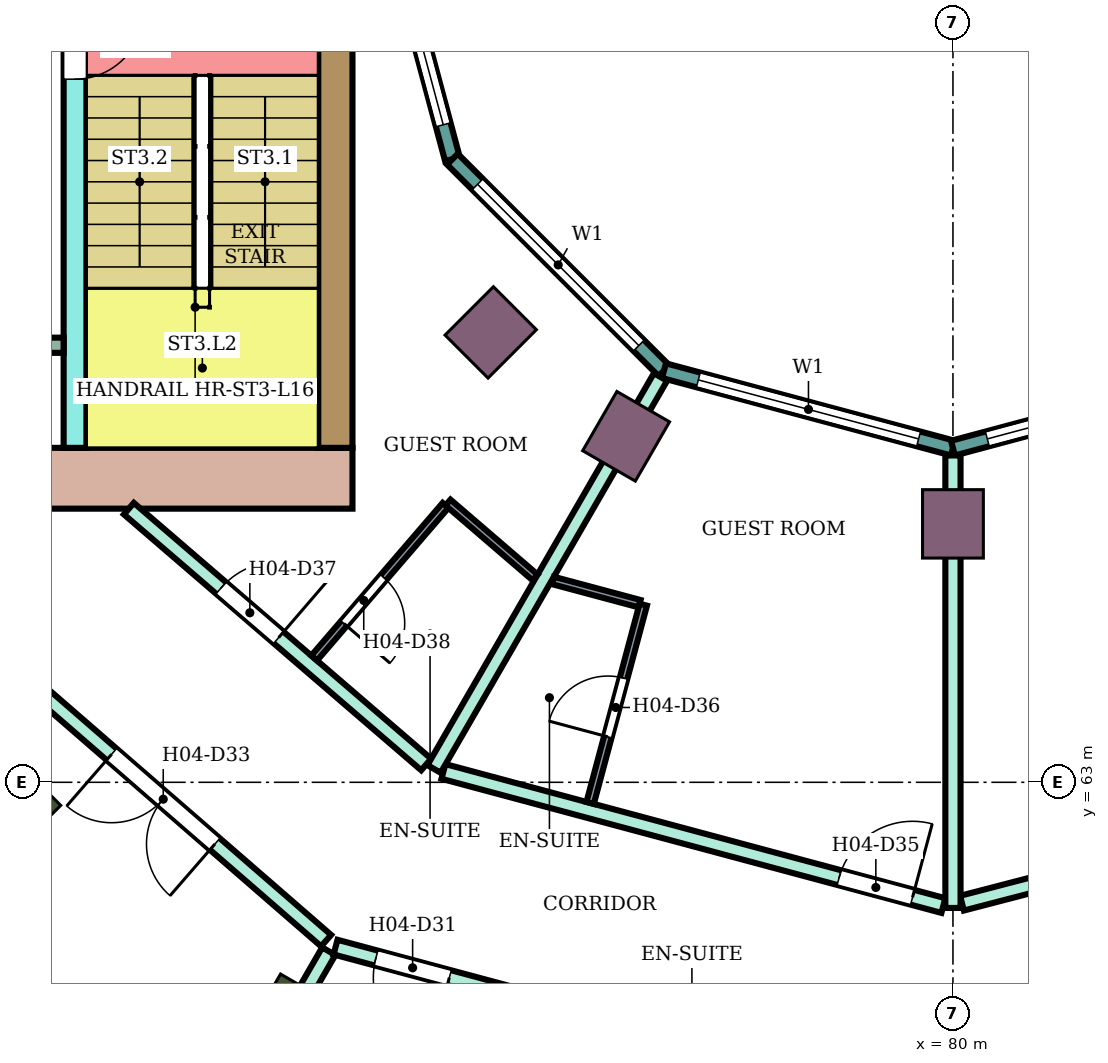
"""IFC4 building model, lengths in metres.
Left out: names, types, materials, properties, quantities, classifications, styles, units other than length and angle.
Written with IfcOpenShell. Run it as: python <this file> out.ifc"""

import sys

from ifc_helpers import new_model, si_unit, direction, frame, frame_2d, origin, origin_2d, place, context, subcontext, project, spatial, rectangle, extrude, element, fill, save


model = new_model("IFC4")
c1 = context("Model", 3, precision=1e-05, world=origin(), true_north=direction((0.0, 1.0)))
c2 = subcontext(c1, "Body", "Model", "MODEL_VIEW")
j1 = project(units=[si_unit("LENGTHUNIT", "METRE"), si_unit("PLANEANGLEUNIT", "RADIAN")], contexts=[c1])
p1 = place(None, origin())
s1 = spatial("IfcSite", under=j1, at=p1, CompositionType="ELEMENT")
p2 = place(p1, origin())
s2 = spatial("IfcBuilding", under=s1, at=p2, CompositionType="ELEMENT")
p3 = place(p2, frame((0.0, 0.0, 70.6)))
s3 = spatial("IfcBuildingStorey", under=s2, at=p3, CompositionType="ELEMENT", Elevation=70.6)
for number, where, z_axis, x_axis in (
    (1, (67.555, 62.555, 0.0), (0.0, 0.0, 1.0), (-0.707, -0.707, 0.0)),
    (2, (71.2, 59.758, 0.0), (0.0, 0.0, 1.0), (-0.5, -0.866, 0.0)),
):
    element("IfcColumn", number, at=place(p3, frame(where, z_axis=z_axis, x_axis=x_axis)), inside=s3, PredefinedType="COLUMN", context=c2, shape_type="SweptSolid", body=[
        extrude(rectangle(XDim=1.2, YDim=0.8, at=origin_2d()), origin(), (0.0, 0.0, 1.0), 3.8),
    ])
for number, where, z_axis, x_axis in (
    (3, (73.919, 68.919, 0.0), (0.0, 0.0, 1.0), (-0.707, -0.707, 0.0)),
    (4, (75.7, 67.552, 0.0), (0.0, 0.0, 1.0), (-0.5, -0.866, 0.0)),
    (5, (80.0, 66.4, 0.0), (0.0, 0.0, 1.0), (0.0, -1.0, 0.0)),
):
    element("IfcColumn", number, at=place(p3, frame(where, z_axis=z_axis, x_axis=x_axis)), inside=s3, PredefinedType="COLUMN", context=c2, shape_type="SweptSolid", body=[
        extrude(rectangle(XDim=0.9, YDim=0.8, at=origin_2d()), origin(), (0.0, 0.0, 1.0), 3.8),
    ])
p4 = place(p3, frame((72.1, 67.0, 0.0), z_axis=(0.0, 0.0, 1.0), x_axis=(-1.0, 0.0, 0.0)))
e6 = element("IfcWall", 6, at=p4, inside=s3, PredefinedType="SHEAR", context=c2, shape_type="SweptSolid", body=[
    extrude(rectangle(XDim=14.7, YDim=0.8, at=frame_2d((7.35, 0.0))), origin(), (0.0, 0.0, 1.0), 3.4),
])
p5 = place(p4, frame((4.2, 0.0, 0.0)))
e7 = element("IfcOpeningElement", 7, at=p5, cuts=e6, PredefinedType="OPENING", context=c2, shape_type="SweptSolid", body=[
    extrude(rectangle(XDim=2.4, YDim=2.4, at=frame_2d((1.2, 1.2))), frame((0.0, 0.41, 0.0), z_axis=(0.0, -1.0, 0.0), x_axis=(1.0, 0.0, 0.0)), (0.0, 0.0, 1.0), 0.82),
])
p6 = place(p3, frame((71.875, 75.0, 0.0), z_axis=(0.0, 0.0, 1.0), x_axis=(0.0, -1.0, 0.0)))
e8 = element("IfcWall", 8, at=p6, inside=s3, PredefinedType="SHEAR", context=c2, shape_type="SweptSolid", body=[
    extrude(rectangle(XDim=7.6, YDim=0.45, at=frame_2d((3.8, 0.0))), origin(), (0.0, 0.0, 1.0), 3.4),
])
p7 = place(p3, frame((68.45, 75.0, 0.0), z_axis=(0.0, 0.0, 1.0), x_axis=(0.0, -1.0, 0.0)))
e9 = element("IfcWall", 9, at=p7, inside=s3, PredefinedType="SHEAR", context=c2, shape_type="SweptSolid", body=[
    extrude(rectangle(XDim=7.6, YDim=0.3, at=frame_2d((3.8, 0.0))), origin(), (0.0, 0.0, 1.0), 3.4),
])
p8 = place(p7, frame((1.85, 0.0, 0.0)))
e10 = element("IfcOpeningElement", 10, at=p8, cuts=e9, PredefinedType="OPENING", context=c2, shape_type="SweptSolid", body=[
    extrude(rectangle(XDim=0.9, YDim=2.1, at=frame_2d((0.45, 1.05))), frame((0.0, 0.16, 0.0), z_axis=(0.0, -1.0, 0.0), x_axis=(1.0, 0.0, 0.0)), (0.0, 0.0, 1.0), 0.32),
])
p9 = place(p3, frame((68.3, 68.75, 0.0), z_axis=(0.0, 0.0, 1.0), x_axis=(-1.0, 0.0, 0.0)))
e11 = element("IfcWall", 11, at=p9, inside=s3, PredefinedType="SHEAR", context=c2, shape_type="SweptSolid", body=[
    extrude(rectangle(XDim=4.65, YDim=0.2, at=frame_2d((2.325, 0.0))), origin(), (0.0, 0.0, 1.0), 3.4),
])
p10 = place(p3, frame((72.396, 75.0, 0.0), z_axis=(0.0, 0.0, 1.0), x_axis=(0.258789828301, -0.965933654434, 0.0)))
e12 = element("IfcWall", 12, at=p10, inside=s3, PredefinedType="NOTDEFINED", context=c2, shape_type="SweptSolid", body=[
    extrude(rectangle(XDim=3.936, YDim=0.2, at=frame_2d((1.968, 0.0))), origin(), (0.0, 0.0, 1.0), 3.8),
])
p11 = place(p10, frame((0.468, 0.0, 0.9)))
e13 = element("IfcOpeningElement", 13, at=p11, cuts=e12, PredefinedType="OPENING", context=c2, shape_type="SweptSolid", body=[
    extrude(rectangle(XDim=3.0, YDim=2.3, at=frame_2d((1.5, 1.15))), frame((0.0, 0.11, 0.0), z_axis=(0.0, -1.0, 0.0), x_axis=(1.0, 0.0, 0.0)), (0.0, 0.0, 1.0), 0.22),
])
p12 = place(p3, frame((73.415, 71.198, 0.0), z_axis=(0.0, 0.0, 1.0), x_axis=(0.707106781187, -0.707106781187, 0.0)))
e14 = element("IfcWall", 14, at=p12, inside=s3, PredefinedType="NOTDEFINED", context=c2, shape_type="SweptSolid", body=[
    extrude(rectangle(XDim=3.936, YDim=0.2, at=frame_2d((1.968, 0.0))), origin(), (0.0, 0.0, 1.0), 3.8),
])
p13 = place(p12, frame((0.468, 0.0, 0.9)))
e15 = element("IfcOpeningElement", 15, at=p13, cuts=e14, PredefinedType="OPENING", context=c2, shape_type="SweptSolid", body=[
    extrude(rectangle(XDim=3.0, YDim=2.3, at=frame_2d((1.5, 1.15))), frame((0.0, 0.11, 0.0), z_axis=(0.0, -1.0, 0.0), x_axis=(1.0, 0.0, 0.0)), (0.0, 0.0, 1.0), 0.22),
])
p14 = place(p3, frame((76.198, 68.415, 0.0), z_axis=(0.0, 0.0, 1.0), x_axis=(0.965933654434, -0.258789828301, 0.0)))
e16 = element("IfcWall", 16, at=p14, inside=s3, PredefinedType="NOTDEFINED", context=c2, shape_type="SweptSolid", body=[
    extrude(rectangle(XDim=3.936, YDim=0.2, at=frame_2d((1.968, 0.0))), origin(), (0.0, 0.0, 1.0), 3.8),
])
p15 = place(p14, frame((0.468, 0.0, 0.9)))
e17 = element("IfcOpeningElement", 17, at=p15, cuts=e16, PredefinedType="OPENING", context=c2, shape_type="SweptSolid", body=[
    extrude(rectangle(XDim=3.0, YDim=2.3, at=frame_2d((1.5, 1.15))), frame((0.0, 0.11, 0.0), z_axis=(0.0, -1.0, 0.0), x_axis=(1.0, 0.0, 0.0)), (0.0, 0.0, 1.0), 0.22),
])
p16 = place(p3, frame((80.0, 67.396, 0.0), z_axis=(0.0, 0.0, 1.0), x_axis=(0.965933654434, 0.258789828301, 0.0)))
e18 = element("IfcWall", 18, at=p16, inside=s3, PredefinedType="NOTDEFINED", context=c2, shape_type="SweptSolid", body=[
    extrude(rectangle(XDim=3.936, YDim=0.2, at=frame_2d((1.968, 0.0))), origin(), (0.0, 0.0, 1.0), 3.8),
])
p17 = place(p16, frame((0.468, 0.0, 0.9)))
e19 = element("IfcOpeningElement", 19, at=p17, cuts=e18, PredefinedType="OPENING", context=c2, shape_type="SweptSolid", body=[
    extrude(rectangle(XDim=3.0, YDim=2.3, at=frame_2d((1.5, 1.15))), frame((0.0, 0.11, 0.0), z_axis=(0.0, -1.0, 0.0), x_axis=(1.0, 0.0, 0.0)), (0.0, 0.0, 1.0), 0.22),
])
p18 = place(p3, frame((66.924, 65.111, 0.0), z_axis=(0.0, 0.0, 1.0), x_axis=(0.755023669255, -0.655697536113, 0.0)))
e20 = element("IfcWall", 20, at=p18, inside=s3, PredefinedType="PARTITIONING", context=c2, shape_type="SweptSolid", body=[
    extrude(rectangle(XDim=6.396, YDim=0.2, at=frame_2d((3.198, 0.0))), origin(), (0.0, 0.0, 1.0), 3.35),
])
p19 = place(p18, frame((2.658, 0.0, 0.0)))
e21 = element("IfcOpeningElement", 21, at=p19, cuts=e20, PredefinedType="OPENING", context=c2, shape_type="SweptSolid", body=[
    extrude(rectangle(XDim=1.8, YDim=2.1, at=frame_2d((0.9, 1.05))), frame((0.0, 0.11, 0.0), z_axis=(0.0, -1.0, 0.0), x_axis=(1.0, 0.0, 0.0)), (0.0, 0.0, 1.0), 0.22),
])
p20 = place(p3, frame((67.099, 52.661, 0.0), z_axis=(0.0, 0.0, 1.0), x_axis=(0.500234203776, 0.86589014394, 0.0)))
e22 = element("IfcWall", 22, at=p20, inside=s3, PredefinedType="PARTITIONING", context=c2, shape_type="SweptSolid", body=[
    extrude(rectangle(XDim=9.374, YDim=0.2, at=frame_2d((4.687, 0.0))), origin(), (0.0, 0.0, 1.0), 3.35),
])
p21 = place(p3, frame((69.158, 66.6, 0.0), z_axis=(0.0, 0.0, 1.0), x_axis=(0.757976058094, -0.652282373943, 0.0)))
e23 = element("IfcWall", 23, at=p21, inside=s3, PredefinedType="PARTITIONING", context=c2, shape_type="SweptSolid", body=[
    extrude(rectangle(XDim=5.16, YDim=0.2, at=frame_2d((2.58, 0.0))), origin(), (0.0, 0.0, 1.0), 3.35),
])
p22 = place(p21, frame((1.6, 0.0, 0.0)))
e24 = element("IfcOpeningElement", 24, at=p22, cuts=e23, PredefinedType="OPENING", context=c2, shape_type="SweptSolid", body=[
    extrude(rectangle(XDim=1.0, YDim=2.1, at=frame_2d((0.5, 1.05))), frame((0.0, 0.11, 0.0), z_axis=(0.0, -1.0, 0.0), x_axis=(1.0, 0.0, 0.0)), (0.0, 0.0, 1.0), 0.22),
])
p23 = place(p3, frame((71.877, 60.832, 0.0), z_axis=(0.0, 0.0, 1.0), x_axis=(0.965852509869, -0.259092510851, 0.0)))
e25 = element("IfcWall", 25, at=p23, inside=s3, PredefinedType="PARTITIONING", context=c2, shape_type="SweptSolid", body=[
    extrude(rectangle(XDim=8.32, YDim=0.2, at=frame_2d((4.16, 0.0))), origin(), (0.0, 0.0, 1.0), 3.35),
])
p24 = place(p23, frame((6.86, 0.0, 0.0)))
e26 = element("IfcOpeningElement", 26, at=p24, cuts=e25, PredefinedType="OPENING", context=c2, shape_type="SweptSolid", body=[
    extrude(rectangle(XDim=1.0, YDim=2.1, at=frame_2d((0.5, 1.05))), frame((0.0, 0.11, 0.0), z_axis=(0.0, -1.0, 0.0), x_axis=(1.0, 0.0, 0.0)), (0.0, 0.0, 1.0), 0.22),
])
p25 = place(p23, frame((0.55, 0.0, 0.0)))
e27 = element("IfcOpeningElement", 27, at=p25, cuts=e25, PredefinedType="OPENING", context=c2, shape_type="SweptSolid", body=[
    extrude(rectangle(XDim=1.0, YDim=2.1, at=frame_2d((0.5, 1.05))), frame((0.0, 0.11, 0.0), z_axis=(0.0, -1.0, 0.0), x_axis=(1.0, 0.0, 0.0)), (0.0, 0.0, 1.0), 0.22),
])
p26 = place(p3, frame((73.297, 63.143, 0.0), z_axis=(0.0, 0.0, 1.0), x_axis=(0.965859030528, -0.25906820173, 0.0)))
e28 = element("IfcWall", 28, at=p26, inside=s3, PredefinedType="PARTITIONING", context=c2, shape_type="SweptSolid", body=[
    extrude(rectangle(XDim=6.81, YDim=0.2, at=frame_2d((3.405, 0.0))), origin(), (0.0, 0.0, 1.0), 3.35),
])
p27 = place(p26, frame((5.39, 0.0, 0.0)))
e29 = element("IfcOpeningElement", 29, at=p27, cuts=e28, PredefinedType="OPENING", context=c2, shape_type="SweptSolid", body=[
    extrude(rectangle(XDim=1.0, YDim=2.1, at=frame_2d((0.5, 1.05))), frame((0.0, 0.11, 0.0), z_axis=(0.0, -1.0, 0.0), x_axis=(1.0, 0.0, 0.0)), (0.0, 0.0, 1.0), 0.22),
])
p28 = place(p3, frame((73.174, 63.176, 0.0), z_axis=(0.0, 0.0, 1.0), x_axis=(0.500257106344, 0.865876912472, 0.0)))
e30 = element("IfcWall", 30, at=p28, inside=s3, PredefinedType="PARTITIONING", context=c2, shape_type="SweptSolid", body=[
    extrude(rectangle(XDim=5.955, YDim=0.2, at=frame_2d((2.978, 0.0))), origin(), (0.0, 0.0, 1.0), 3.35),
])
p29 = place(p3, frame((80.119, 61.41, 0.0), z_axis=(0.0, 0.0, 1.0), x_axis=(0.967823361235, 0.251630565408, 0.0)))
e31 = element("IfcWall", 31, at=p29, inside=s3, PredefinedType="PARTITIONING", context=c2, shape_type="SweptSolid", body=[
    extrude(rectangle(XDim=6.958, YDim=0.2, at=frame_2d((3.479, 0.0))), origin(), (0.0, 0.0, 1.0), 3.35),
])
p30 = place(p29, frame((2.529, 0.0, 0.0)))
e32 = element("IfcOpeningElement", 32, at=p30, cuts=e31, PredefinedType="OPENING", context=c2, shape_type="SweptSolid", body=[
    extrude(rectangle(XDim=1.8, YDim=2.1, at=frame_2d((0.9, 1.05))), frame((0.0, 0.11, 0.0), z_axis=(0.0, -1.0, 0.0), x_axis=(1.0, 0.0, 0.0)), (0.0, 0.0, 1.0), 0.22),
])
p31 = place(p3, frame((80.0, 58.655, 0.0), z_axis=(0.0, 0.0, 1.0), x_axis=(0.965974635626, 0.258636817424, 0.0)))
e33 = element("IfcWall", 33, at=p31, inside=s3, PredefinedType="PARTITIONING", context=c2, shape_type="SweptSolid", body=[
    extrude(rectangle(XDim=8.36, YDim=0.2, at=frame_2d((4.18, 0.0))), origin(), (0.0, 0.0, 1.0), 3.35),
])
p32 = place(p31, frame((6.86, 0.0, 0.0)))
e34 = element("IfcOpeningElement", 34, at=p32, cuts=e33, PredefinedType="OPENING", context=c2, shape_type="SweptSolid", body=[
    extrude(rectangle(XDim=1.0, YDim=2.1, at=frame_2d((0.5, 1.05))), frame((0.0, 0.11, 0.0), z_axis=(0.0, -1.0, 0.0), x_axis=(1.0, 0.0, 0.0)), (0.0, 0.0, 1.0), 0.22),
])
p33 = place(p31, frame((0.55, 0.0, 0.0)))
e35 = element("IfcOpeningElement", 35, at=p33, cuts=e33, PredefinedType="OPENING", context=c2, shape_type="SweptSolid", body=[
    extrude(rectangle(XDim=1.0, YDim=2.1, at=frame_2d((0.5, 1.05))), frame((0.0, 0.11, 0.0), z_axis=(0.0, -1.0, 0.0), x_axis=(1.0, 0.0, 0.0)), (0.0, 0.0, 1.0), 0.22),
])
p34 = place(p3, frame((80.0, 61.347, 0.0), z_axis=(0.0, 0.0, 1.0), x_axis=(0.0, 1.0, 0.0)))
e36 = element("IfcWall", 36, at=p34, inside=s3, PredefinedType="PARTITIONING", context=c2, shape_type="SweptSolid", body=[
    extrude(rectangle(XDim=5.953, YDim=0.2, at=frame_2d((2.977, 0.0))), origin(), (0.0, 0.0, 1.0), 3.35),
])
p35 = place(p3, frame((71.596, 64.635, 0.0), z_axis=(0.0, 0.0, 1.0), x_axis=(0.652285007511, 0.757973791748, 0.0)))
e37 = element("IfcWall", 37, at=p35, inside=s3, PredefinedType="PARTITIONING", context=c2, shape_type="SweptSolid", body=[
    extrude(rectangle(XDim=2.65, YDim=0.1, at=frame_2d((1.325, 0.0))), origin(), (0.0, 0.0, 1.0), 3.35),
])
p36 = place(p35, frame((0.6, 0.0, 0.0)))
e38 = element("IfcOpeningElement", 38, at=p36, cuts=e37, PredefinedType="OPENING", context=c2, shape_type="SweptSolid", body=[
    extrude(rectangle(XDim=0.8, YDim=2.1, at=frame_2d((0.4, 1.05))), frame((0.0, 0.06, 0.0), z_axis=(0.0, -1.0, 0.0), x_axis=(1.0, 0.0, 0.0)), (0.0, 0.0, 1.0), 0.12),
])
p37 = place(p3, frame((73.357, 66.681, 0.0), z_axis=(0.0, 0.0, 1.0), x_axis=(0.758263469747, -0.651948242154, 0.0)))
e39 = element("IfcWall", 39, at=p37, inside=s3, PredefinedType="PARTITIONING", context=c2, shape_type="SweptSolid", body=[
    extrude(rectangle(XDim=1.511, YDim=0.1, at=frame_2d((0.755, 0.0))), origin(), (0.0, 0.0, 1.0), 3.35),
])
p38 = place(p3, frame((74.739, 65.655, 0.0), z_axis=(0.0, 0.0, 1.0), x_axis=(0.96591107063, -0.258874107695, 0.0)))
e40 = element("IfcWall", 40, at=p38, inside=s3, PredefinedType="PARTITIONING", context=c2, shape_type="SweptSolid", body=[
    extrude(rectangle(XDim=1.179, YDim=0.1, at=frame_2d((0.589, 0.0))), origin(), (0.0, 0.0, 1.0), 3.35),
])
p39 = place(p3, frame((75.227, 62.729, 0.0), z_axis=(0.0, 0.0, 1.0), x_axis=(0.258945475746, 0.965891940432, 0.0)))
e41 = element("IfcWall", 41, at=p39, inside=s3, PredefinedType="PARTITIONING", context=c2, shape_type="SweptSolid", body=[
    extrude(rectangle(XDim=2.7, YDim=0.1, at=frame_2d((1.35, 0.0))), origin(), (0.0, 0.0, 1.0), 3.35),
])
p40 = place(p39, frame((0.9, 0.0, 0.0)))
e42 = element("IfcOpeningElement", 42, at=p40, cuts=e41, PredefinedType="OPENING", context=c2, shape_type="SweptSolid", body=[
    extrude(rectangle(XDim=0.8, YDim=2.1, at=frame_2d((0.4, 1.05))), frame((0.0, 0.06, 0.0), z_axis=(0.0, -1.0, 0.0), x_axis=(1.0, 0.0, 0.0)), (0.0, 0.0, 1.0), 0.12),
])
p41 = place(p11, origin())
e43 = element("IfcWindow", 43, at=p41, inside=s3, PartitioningType="SINGLE_PANEL", PredefinedType="WINDOW", context=c2, shape_type="SweptSolid", body=[
    extrude(rectangle(XDim=3.0, YDim=2.3, at=frame_2d((1.5, 1.15))), frame((0.0, 0.03, 0.0), z_axis=(0.0, -1.0, 0.0), x_axis=(1.0, 0.0, 0.0)), (0.0, 0.0, 1.0), 0.06),
])
fill(e13, e43)
p42 = place(p13, origin())
e44 = element("IfcWindow", 44, at=p42, inside=s3, PartitioningType="SINGLE_PANEL", PredefinedType="WINDOW", context=c2, shape_type="SweptSolid", body=[
    extrude(rectangle(XDim=3.0, YDim=2.3, at=frame_2d((1.5, 1.15))), frame((0.0, 0.03, 0.0), z_axis=(0.0, -1.0, 0.0), x_axis=(1.0, 0.0, 0.0)), (0.0, 0.0, 1.0), 0.06),
])
fill(e15, e44)
p43 = place(p15, origin())
e45 = element("IfcWindow", 45, at=p43, inside=s3, PartitioningType="SINGLE_PANEL", PredefinedType="WINDOW", context=c2, shape_type="SweptSolid", body=[
    extrude(rectangle(XDim=3.0, YDim=2.3, at=frame_2d((1.5, 1.15))), frame((0.0, 0.03, 0.0), z_axis=(0.0, -1.0, 0.0), x_axis=(1.0, 0.0, 0.0)), (0.0, 0.0, 1.0), 0.06),
])
fill(e17, e45)
p44 = place(p17, origin())
e46 = element("IfcWindow", 46, at=p44, inside=s3, PartitioningType="SINGLE_PANEL", PredefinedType="WINDOW", context=c2, shape_type="SweptSolid", body=[
    extrude(rectangle(XDim=3.0, YDim=2.3, at=frame_2d((1.5, 1.15))), frame((0.0, 0.03, 0.0), z_axis=(0.0, -1.0, 0.0), x_axis=(1.0, 0.0, 0.0)), (0.0, 0.0, 1.0), 0.06),
])
fill(e19, e46)
p45 = place(p25, frame((1.0, 0.0, 0.0), z_axis=(0.0, 0.0, 1.0), x_axis=(-1.0, 0.0, 0.0)))
e47 = element("IfcDoor", 47, at=p45, inside=s3, OperationType="SINGLE_SWING_LEFT", PredefinedType="DOOR", context=c2, shape_type="SweptSolid", body=[
    extrude(rectangle(XDim=1.0, YDim=2.1, at=frame_2d((0.5, 1.05))), frame((0.0, 0.025, 0.0), z_axis=(0.0, -1.0, 0.0), x_axis=(1.0, 0.0, 0.0)), (0.0, 0.0, 1.0), 0.05),
])
fill(e27, e47)
p46 = place(p19, frame((1.8, 0.0, 0.0), z_axis=(0.0, 0.0, 1.0), x_axis=(-1.0, 0.0, 0.0)))
e48 = element("IfcDoor", 48, at=p46, inside=s3, OperationType="DOUBLE_DOOR_SINGLE_SWING", PredefinedType="DOOR", context=c2, shape_type="SweptSolid", body=[
    extrude(rectangle(XDim=1.8, YDim=2.1, at=frame_2d((0.9, 1.05))), frame((0.0, 0.025, 0.0), z_axis=(0.0, -1.0, 0.0), x_axis=(1.0, 0.0, 0.0)), (0.0, 0.0, 1.0), 0.05),
])
fill(e21, e48)
p47 = place(p27, origin())
e49 = element("IfcDoor", 49, at=p47, inside=s3, OperationType="SINGLE_SWING_RIGHT", PredefinedType="DOOR", context=c2, shape_type="SweptSolid", body=[
    extrude(rectangle(XDim=1.0, YDim=2.1, at=frame_2d((0.5, 1.05))), frame((0.0, 0.025, 0.0), z_axis=(0.0, -1.0, 0.0), x_axis=(1.0, 0.0, 0.0)), (0.0, 0.0, 1.0), 0.05),
])
fill(e29, e49)
p48 = place(p40, origin())
e50 = element("IfcDoor", 50, at=p48, inside=s3, OperationType="SINGLE_SWING_LEFT", PredefinedType="DOOR", context=c2, shape_type="SweptSolid", body=[
    extrude(rectangle(XDim=0.8, YDim=2.1, at=frame_2d((0.4, 1.05))), frame((0.0, 0.025, 0.0), z_axis=(0.0, -1.0, 0.0), x_axis=(1.0, 0.0, 0.0)), (0.0, 0.0, 1.0), 0.05),
])
fill(e42, e50)
p49 = place(p22, origin())
e51 = element("IfcDoor", 51, at=p49, inside=s3, OperationType="SINGLE_SWING_RIGHT", PredefinedType="DOOR", context=c2, shape_type="SweptSolid", body=[
    extrude(rectangle(XDim=1.0, YDim=2.1, at=frame_2d((0.5, 1.05))), frame((0.0, 0.025, 0.0), z_axis=(0.0, -1.0, 0.0), x_axis=(1.0, 0.0, 0.0)), (0.0, 0.0, 1.0), 0.05),
])
fill(e24, e51)
p50 = place(p36, frame((0.8, 0.0, 0.0), z_axis=(0.0, 0.0, 1.0), x_axis=(-1.0, 0.0, 0.0)))
e52 = element("IfcDoor", 52, at=p50, inside=s3, OperationType="SINGLE_SWING_RIGHT", PredefinedType="DOOR", context=c2, shape_type="SweptSolid", body=[
    extrude(rectangle(XDim=0.8, YDim=2.1, at=frame_2d((0.4, 1.05))), frame((0.0, 0.025, 0.0), z_axis=(0.0, -1.0, 0.0), x_axis=(1.0, 0.0, 0.0)), (0.0, 0.0, 1.0), 0.05),
])
fill(e38, e52)
p51 = place(p8, origin())
e53 = element("IfcDoor", 53, at=p51, inside=s3, OperationType="SINGLE_SWING_LEFT", PredefinedType="DOOR", context=c2, shape_type="SweptSolid", body=[
    extrude(rectangle(XDim=0.9, YDim=2.1, at=frame_2d((0.45, 1.05))), frame((0.0, 0.025, 0.0), z_axis=(0.0, -1.0, 0.0), x_axis=(1.0, 0.0, 0.0)), (0.0, 0.0, 1.0), 0.05),
])
fill(e10, e53)
save(model, sys.argv[1])
